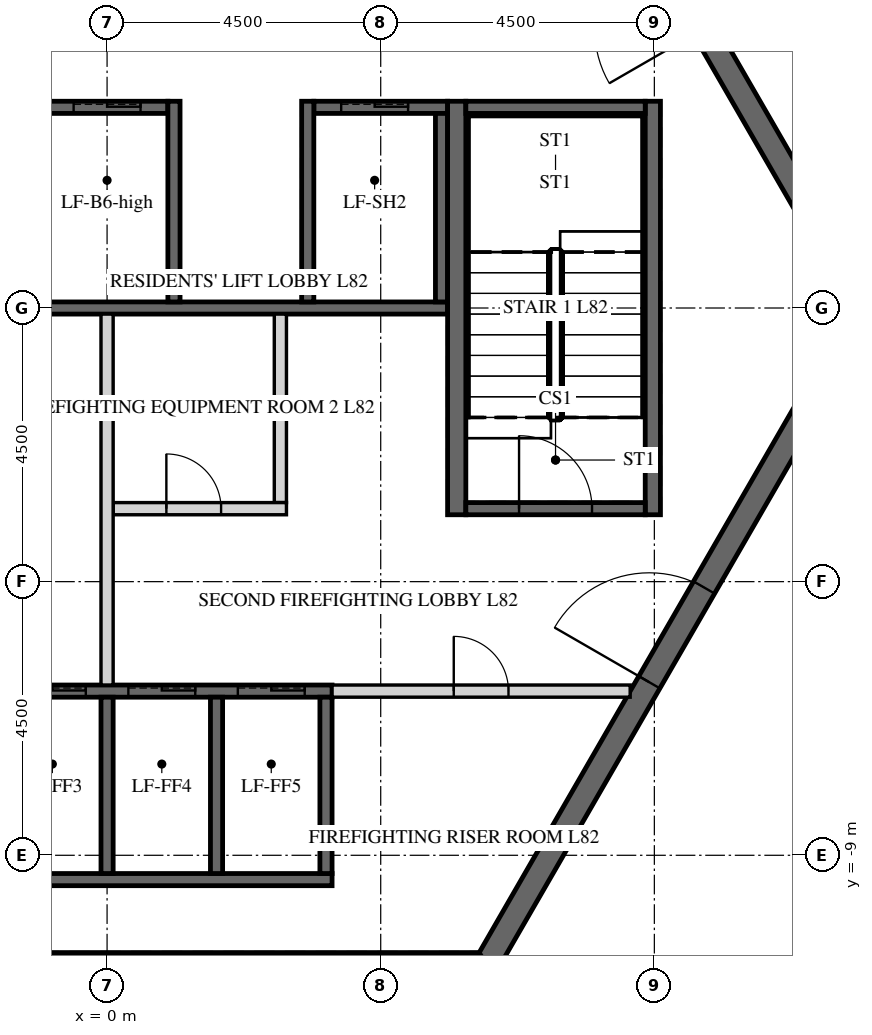
"""IFC4 building model, lengths in metres.
Left out: names, types, materials, properties, quantities, classifications, styles, units other than length and angle.
Written with IfcOpenShell. Run it as: python <this file> out.ifc"""

import sys

from ifc_helpers import new_model, si_unit, direction, frame, frame_2d, origin, place, context, subcontext, project, spatial, polyline, rectangle, outline, extrude, element, fill, save


model = new_model("IFC4")
c1 = context("Model", 3, precision=1e-05, world=origin(), true_north=direction((0.0, 1.0)))
c2 = subcontext(c1, "Body", "Model", "MODEL_VIEW")
j1 = project(units=[si_unit("LENGTHUNIT", "METRE"), si_unit("PLANEANGLEUNIT", "RADIAN")], contexts=[c1])
p1 = place(None, origin())
s1 = spatial("IfcSite", under=j1, at=p1, CompositionType="ELEMENT")
p2 = place(p1, origin())
s2 = spatial("IfcBuilding", under=s1, at=p2, CompositionType="ELEMENT")
p3 = place(p2, frame((0.0, 0.0, 338.1)))
s3 = spatial("IfcBuildingStorey", under=s2, at=p3, CompositionType="ELEMENT", Elevation=338.1)
p4 = place(p3, frame((-6.235, -10.8, -0.3), z_axis=(0.0, 0.0, 1.0), x_axis=(1.0, 0.0, 0.0)))
e1 = element("IfcWall", 1, at=p4, inside=s3, PredefinedType="SHEAR", context=c2, shape_type="SweptSolid", body=[
    extrude(outline(polyline([(-0.115, -0.2), (12.586, -0.2), (12.355, 0.2), (0.115, 0.2), (-0.115, -0.2)])), origin(), (0.0, 0.0, 1.0), 5.4),
])
p5 = place(p3, frame((6.235, -10.8, -0.3), z_axis=(0.0, 0.0, 1.0), x_axis=(0.499996419489, 0.866027470984, 0.0)))
e2 = element("IfcWall", 2, at=p5, inside=s3, PredefinedType="SHEAR", context=c2, shape_type="SweptSolid", body=[
    extrude(outline(polyline([(-0.115, -0.2), (12.586, -0.2), (12.355, 0.2), (0.115, 0.2), (-0.115, -0.2)])), origin(), (0.0, 0.0, 1.0), 5.4),
])
p6 = place(p5, frame((5.364, 0.0, 0.3)))
e3 = element("IfcOpeningElement", 3, at=p6, cuts=e2, PredefinedType="OPENING", context=c2, shape_type="SweptSolid", body=[
    extrude(rectangle(XDim=1.8, YDim=2.4, at=frame_2d((0.9, 1.2))), frame((0.0, 0.21, 0.0), z_axis=(0.0, -1.0, 0.0), x_axis=(1.0, 0.0, 0.0)), (0.0, 0.0, 1.0), 0.42),
])
p7 = place(p3, frame((12.471, 0.0, -0.3), z_axis=(0.0, 0.0, 1.0), x_axis=(-0.499996419489, 0.866027470984, 0.0)))
e4 = element("IfcWall", 4, at=p7, inside=s3, PredefinedType="SHEAR", context=c2, shape_type="SweptSolid", body=[
    extrude(outline(polyline([(-0.115, -0.2), (12.586, -0.2), (12.355, 0.2), (0.115, 0.2), (-0.115, -0.2)])), origin(), (0.0, 0.0, 1.0), 5.4),
])
p8 = place(p7, frame((5.306, 0.0, 0.3)))
e5 = element("IfcOpeningElement", 5, at=p8, cuts=e4, PredefinedType="OPENING", context=c2, shape_type="SweptSolid", body=[
    extrude(rectangle(XDim=1.8, YDim=2.4, at=frame_2d((0.9, 1.2))), frame((0.0, 0.21, 0.0), z_axis=(0.0, -1.0, 0.0), x_axis=(1.0, 0.0, 0.0)), (0.0, 0.0, 1.0), 0.42),
])
p9 = place(p3, frame((-5.6, 3.3, -0.25), z_axis=(0.0, 0.0, 1.0), x_axis=(1.0, 0.0, 0.0)))
e6 = element("IfcWall", 6, at=p9, inside=s3, PredefinedType="SHEAR", context=c2, shape_type="SweptSolid", body=[
    extrude(rectangle(XDim=6.6, YDim=0.2, at=frame_2d((3.3, 0.0))), origin(), (0.0, 0.0, 1.0), 5.4),
])
p10 = place(p9, frame((0.65, 0.0, 0.25)))
e7 = element("IfcOpeningElement", 7, at=p10, cuts=e6, PredefinedType="OPENING", context=c2, shape_type="SweptSolid", body=[
    extrude(rectangle(XDim=1.1, YDim=2.1, at=frame_2d((0.55, 1.05))), frame((0.0, 0.11, 0.0), z_axis=(0.0, -1.0, 0.0), x_axis=(1.0, 0.0, 0.0)), (0.0, 0.0, 1.0), 0.22),
])
p11 = place(p9, frame((2.85, 0.0, 0.25)))
e8 = element("IfcOpeningElement", 8, at=p11, cuts=e6, PredefinedType="OPENING", context=c2, shape_type="SweptSolid", body=[
    extrude(rectangle(XDim=1.1, YDim=2.1, at=frame_2d((0.55, 1.05))), frame((0.0, 0.11, 0.0), z_axis=(0.0, -1.0, 0.0), x_axis=(1.0, 0.0, 0.0)), (0.0, 0.0, 1.0), 0.22),
])
p12 = place(p9, frame((5.05, 0.0, 0.25)))
e9 = element("IfcOpeningElement", 9, at=p12, cuts=e6, PredefinedType="OPENING", context=c2, shape_type="SweptSolid", body=[
    extrude(rectangle(XDim=1.1, YDim=2.1, at=frame_2d((0.55, 1.05))), frame((0.0, 0.11, 0.0), z_axis=(0.0, -1.0, 0.0), x_axis=(1.0, 0.0, 0.0)), (0.0, 0.0, 1.0), 0.22),
])
p13 = place(p3, frame((3.4, 3.3, -0.25), z_axis=(0.0, 0.0, 1.0), x_axis=(1.0, 0.0, 0.0)))
e10 = element("IfcWall", 10, at=p13, inside=s3, PredefinedType="SHEAR", context=c2, shape_type="SweptSolid", body=[
    extrude(rectangle(XDim=2.2, YDim=0.2, at=frame_2d((1.1, 0.0))), origin(), (0.0, 0.0, 1.0), 5.4),
])
p14 = place(p13, frame((0.45, 0.0, 0.25)))
e11 = element("IfcOpeningElement", 11, at=p14, cuts=e10, PredefinedType="OPENING", context=c2, shape_type="SweptSolid", body=[
    extrude(rectangle(XDim=1.1, YDim=2.1, at=frame_2d((0.55, 1.05))), frame((0.0, 0.11, 0.0), z_axis=(0.0, -1.0, 0.0), x_axis=(1.0, 0.0, 0.0)), (0.0, 0.0, 1.0), 0.22),
])
p15 = place(p3, frame((-5.6, 0.0, -0.25), z_axis=(0.0, 0.0, 1.0), x_axis=(1.0, 0.0, 0.0)))
e12 = element("IfcWall", 12, at=p15, inside=s3, PredefinedType="SHEAR", context=c2, shape_type="SweptSolid", body=[
    extrude(rectangle(XDim=11.2, YDim=0.2, at=frame_2d((5.6, 0.0))), origin(), (0.0, 0.0, 1.0), 5.4),
])
for number, where, z_axis, x_axis in (
    (13, (1.1, 0.1, -0.25), (0.0, 0.0, 1.0), (0.0, 1.0, 0.0)),
    (14, (3.3, 0.1, -0.25), (0.0, 0.0, 1.0), (0.0, 1.0, 0.0)),
):
    element("IfcWall", number, at=place(p3, frame(where, z_axis=z_axis, x_axis=x_axis)), inside=s3, PredefinedType="SHEAR", context=c2, shape_type="SweptSolid", body=[
        extrude(rectangle(XDim=3.3, YDim=0.2, at=frame_2d((1.65, 0.0))), origin(), (0.0, 0.0, 1.0), 5.4),
    ])
p16 = place(p3, frame((5.5, 0.1, -0.25), z_axis=(0.0, 0.0, 1.0), x_axis=(0.0, 1.0, 0.0)))
e15 = element("IfcWall", 15, at=p16, inside=s3, PredefinedType="SHEAR", context=c2, shape_type="SweptSolid", body=[
    extrude(rectangle(XDim=3.1, YDim=0.2, at=frame_2d((1.55, 0.0))), origin(), (0.0, 0.0, 1.0), 5.4),
])
p17 = place(p3, frame((-5.5, -6.3, -0.25), z_axis=(0.0, 0.0, 1.0), x_axis=(1.0, 0.0, 0.0)))
e16 = element("IfcWall", 16, at=p17, inside=s3, PredefinedType="SHEAR", context=c2, shape_type="SweptSolid", body=[
    extrude(rectangle(XDim=9.2, YDim=0.2, at=frame_2d((4.6, 0.0))), origin(), (0.0, 0.0, 1.0), 5.4),
])
p18 = place(p17, frame((0.45, 0.0, 0.25)))
e17 = element("IfcOpeningElement", 17, at=p18, cuts=e16, PredefinedType="OPENING", context=c2, shape_type="SweptSolid", body=[
    extrude(rectangle(XDim=1.1, YDim=2.1, at=frame_2d((0.55, 1.05))), frame((0.0, 0.11, 0.0), z_axis=(0.0, -1.0, 0.0), x_axis=(1.0, 0.0, 0.0)), (0.0, 0.0, 1.0), 0.22),
])
p19 = place(p17, frame((2.25, 0.0, 0.25)))
e18 = element("IfcOpeningElement", 18, at=p19, cuts=e16, PredefinedType="OPENING", context=c2, shape_type="SweptSolid", body=[
    extrude(rectangle(XDim=1.1, YDim=2.1, at=frame_2d((0.55, 1.05))), frame((0.0, 0.11, 0.0), z_axis=(0.0, -1.0, 0.0), x_axis=(1.0, 0.0, 0.0)), (0.0, 0.0, 1.0), 0.22),
])
p20 = place(p17, frame((4.05, 0.0, 0.25)))
e19 = element("IfcOpeningElement", 19, at=p20, cuts=e16, PredefinedType="OPENING", context=c2, shape_type="SweptSolid", body=[
    extrude(rectangle(XDim=1.1, YDim=2.1, at=frame_2d((0.55, 1.05))), frame((0.0, 0.11, 0.0), z_axis=(0.0, -1.0, 0.0), x_axis=(1.0, 0.0, 0.0)), (0.0, 0.0, 1.0), 0.22),
])
p21 = place(p17, frame((5.85, 0.0, 0.25)))
e20 = element("IfcOpeningElement", 20, at=p21, cuts=e16, PredefinedType="OPENING", context=c2, shape_type="SweptSolid", body=[
    extrude(rectangle(XDim=1.1, YDim=2.1, at=frame_2d((0.55, 1.05))), frame((0.0, 0.11, 0.0), z_axis=(0.0, -1.0, 0.0), x_axis=(1.0, 0.0, 0.0)), (0.0, 0.0, 1.0), 0.22),
])
p22 = place(p17, frame((7.65, 0.0, 0.25)))
e21 = element("IfcOpeningElement", 21, at=p22, cuts=e16, PredefinedType="OPENING", context=c2, shape_type="SweptSolid", body=[
    extrude(rectangle(XDim=1.1, YDim=2.1, at=frame_2d((0.55, 1.05))), frame((0.0, 0.11, 0.0), z_axis=(0.0, -1.0, 0.0), x_axis=(1.0, 0.0, 0.0)), (0.0, 0.0, 1.0), 0.22),
])
p23 = place(p3, frame((-5.5, -9.4, -0.25), z_axis=(0.0, 0.0, 1.0), x_axis=(1.0, 0.0, 0.0)))
e22 = element("IfcWall", 22, at=p23, inside=s3, PredefinedType="SHEAR", context=c2, shape_type="SweptSolid", body=[
    extrude(rectangle(XDim=9.2, YDim=0.2, at=frame_2d((4.6, 0.0))), origin(), (0.0, 0.0, 1.0), 5.4),
])
for number, where, z_axis, x_axis in (
    (23, (0.0, -9.3, -0.25), (0.0, 0.0, 1.0), (0.0, 1.0, 0.0)),
    (24, (1.8, -9.3, -0.25), (0.0, 0.0, 1.0), (0.0, 1.0, 0.0)),
    (25, (3.6, -9.3, -0.25), (0.0, 0.0, 1.0), (0.0, 1.0, 0.0)),
):
    element("IfcWall", number, at=place(p3, frame(where, z_axis=z_axis, x_axis=x_axis)), inside=s3, PredefinedType="SHEAR", context=c2, shape_type="SweptSolid", body=[
        extrude(rectangle(XDim=2.9, YDim=0.2, at=frame_2d((1.45, 0.0))), origin(), (0.0, 0.0, 1.0), 5.4),
    ])
p24 = place(p3, frame((0.1, -3.3, 0.0), z_axis=(0.0, 0.0, 1.0), x_axis=(1.0, 0.0, 0.0)))
e26 = element("IfcWall", 26, at=p24, inside=s3, PredefinedType="PARTITIONING", context=c2, shape_type="SweptSolid", body=[
    extrude(rectangle(XDim=2.85, YDim=0.2, at=frame_2d((1.425, 0.0))), origin(), (0.0, 0.0, 1.0), 5.15),
])
p25 = place(p24, frame((0.875, 0.0, 0.0)))
e27 = element("IfcOpeningElement", 27, at=p25, cuts=e26, PredefinedType="OPENING", context=c2, shape_type="SweptSolid", body=[
    extrude(rectangle(XDim=0.9, YDim=2.1, at=frame_2d((0.45, 1.05))), frame((0.0, 0.11, 0.0), z_axis=(0.0, -1.0, 0.0), x_axis=(1.0, 0.0, 0.0)), (0.0, 0.0, 1.0), 0.22),
])
p26 = place(p3, frame((2.85, -3.2, 0.0), z_axis=(0.0, 0.0, 1.0), x_axis=(0.0, 1.0, 0.0)))
e28 = element("IfcWall", 28, at=p26, inside=s3, PredefinedType="PARTITIONING", context=c2, shape_type="SweptSolid", body=[
    extrude(rectangle(XDim=3.1, YDim=0.2, at=frame_2d((1.55, 0.0))), origin(), (0.0, 0.0, 1.0), 5.15),
])
p27 = place(p3, frame((0.0, -6.2, 0.0), z_axis=(0.0, 0.0, 1.0), x_axis=(0.0, 1.0, 0.0)))
e29 = element("IfcWall", 29, at=p27, inside=s3, PredefinedType="PARTITIONING", context=c2, shape_type="SweptSolid", body=[
    extrude(rectangle(XDim=6.1, YDim=0.2, at=frame_2d((3.05, 0.0))), origin(), (0.0, 0.0, 1.0), 5.15),
])
p28 = place(p3, frame((3.7, -6.3, 0.0), z_axis=(0.0, 0.0, 1.0), x_axis=(1.0, 0.0, 0.0)))
e30 = element("IfcWall", 30, at=p28, inside=s3, PredefinedType="PARTITIONING", context=c2, shape_type="SweptSolid", body=[
    extrude(rectangle(XDim=4.903, YDim=0.2, at=frame_2d((2.451, 0.0))), origin(), (0.0, 0.0, 1.0), 5.15),
])
p29 = place(p28, frame((2.001, 0.0, 0.0)))
e31 = element("IfcOpeningElement", 31, at=p29, cuts=e30, PredefinedType="OPENING", context=c2, shape_type="SweptSolid", body=[
    extrude(rectangle(XDim=0.9, YDim=2.1, at=frame_2d((0.45, 1.05))), frame((0.0, 0.11, 0.0), z_axis=(0.0, -1.0, 0.0), x_axis=(1.0, 0.0, 0.0)), (0.0, 0.0, 1.0), 0.22),
])
p30 = place(p3, frame((5.75, -3.4, -0.25), z_axis=(0.0, 0.0, 1.0), x_axis=(0.0, 1.0, 0.0)))
e32 = element("IfcWall", 32, at=p30, inside=s3, PredefinedType="SHEAR", context=c2, shape_type="SweptSolid", body=[
    extrude(rectangle(XDim=6.8, YDim=0.3, at=frame_2d((3.4, 0.0))), origin(), (0.0, 0.0, 1.0), 5.4),
])
p31 = place(p3, frame((8.975, -3.4, -0.25), z_axis=(0.0, 0.0, 1.0), x_axis=(0.0, 1.0, 0.0)))
e33 = element("IfcWall", 33, at=p31, inside=s3, PredefinedType="SHEAR", context=c2, shape_type="SweptSolid", body=[
    extrude(rectangle(XDim=6.8, YDim=0.25, at=frame_2d((3.4, 0.0))), origin(), (0.0, 0.0, 1.0), 5.4),
])
p32 = place(p3, frame((5.9, 3.3, -0.25), z_axis=(0.0, 0.0, 1.0), x_axis=(1.0, 0.0, 0.0)))
e34 = element("IfcWall", 34, at=p32, inside=s3, PredefinedType="SHEAR", context=c2, shape_type="SweptSolid", body=[
    extrude(rectangle(XDim=2.95, YDim=0.2, at=frame_2d((1.475, 0.0))), origin(), (0.0, 0.0, 1.0), 5.4),
])
p33 = place(p3, frame((5.9, -3.3, -0.25), z_axis=(0.0, 0.0, 1.0), x_axis=(1.0, 0.0, 0.0)))
e35 = element("IfcWall", 35, at=p33, inside=s3, PredefinedType="SHEAR", context=c2, shape_type="SweptSolid", body=[
    extrude(rectangle(XDim=2.95, YDim=0.2, at=frame_2d((1.475, 0.0))), origin(), (0.0, 0.0, 1.0), 5.4),
])
p34 = place(p33, frame((0.875, 0.0, 0.25)))
e36 = element("IfcOpeningElement", 36, at=p34, cuts=e35, PredefinedType="OPENING", context=c2, shape_type="SweptSolid", body=[
    extrude(rectangle(XDim=1.2, YDim=2.4, at=frame_2d((0.6, 1.2))), frame((0.0, 0.11, 0.0), z_axis=(0.0, -1.0, 0.0), x_axis=(1.0, 0.0, 0.0)), (0.0, 0.0, 1.0), 0.22),
])
p35 = place(p6, origin())
e37 = element("IfcDoor", 37, at=p35, inside=s3, OperationType="DOUBLE_DOOR_SINGLE_SWING", PredefinedType="DOOR", context=c2, shape_type="SweptSolid", body=[
    extrude(rectangle(XDim=1.8, YDim=2.4, at=frame_2d((0.9, 1.2))), frame((0.0, 0.025, 0.0), z_axis=(0.0, -1.0, 0.0), x_axis=(1.0, 0.0, 0.0)), (0.0, 0.0, 1.0), 0.05),
])
fill(e3, e37)
p36 = place(p25, origin())
e38 = element("IfcDoor", 38, at=p36, inside=s3, OperationType="SINGLE_SWING_LEFT", PredefinedType="DOOR", context=c2, shape_type="SweptSolid", body=[
    extrude(rectangle(XDim=0.9, YDim=2.1, at=frame_2d((0.45, 1.05))), frame((0.0, 0.025, 0.0), z_axis=(0.0, -1.0, 0.0), x_axis=(1.0, 0.0, 0.0)), (0.0, 0.0, 1.0), 0.05),
])
fill(e27, e38)
p37 = place(p29, origin())
e39 = element("IfcDoor", 39, at=p37, inside=s3, OperationType="SINGLE_SWING_LEFT", PredefinedType="DOOR", context=c2, shape_type="SweptSolid", body=[
    extrude(rectangle(XDim=0.9, YDim=2.1, at=frame_2d((0.45, 1.05))), frame((0.0, 0.025, 0.0), z_axis=(0.0, -1.0, 0.0), x_axis=(1.0, 0.0, 0.0)), (0.0, 0.0, 1.0), 0.05),
])
fill(e31, e39)
p38 = place(p34, origin())
e40 = element("IfcDoor", 40, at=p38, inside=s3, OperationType="SINGLE_SWING_LEFT", PredefinedType="DOOR", context=c2, shape_type="SweptSolid", body=[
    extrude(rectangle(XDim=1.2, YDim=2.4, at=frame_2d((0.6, 1.2))), frame((0.0, 0.025, 0.0), z_axis=(0.0, -1.0, 0.0), x_axis=(1.0, 0.0, 0.0)), (0.0, 0.0, 1.0), 0.05),
])
fill(e36, e40)
p39 = place(p12, origin())
e41 = element("IfcDoor", 41, at=p39, inside=s3, OperationType="SLIDING_TO_LEFT", PredefinedType="DOOR", context=c2, shape_type="SweptSolid", body=[
    extrude(rectangle(XDim=1.1, YDim=2.1, at=frame_2d((0.55, 1.05))), frame((0.0, 0.025, 0.0), z_axis=(0.0, -1.0, 0.0), x_axis=(1.0, 0.0, 0.0)), (0.0, 0.0, 1.0), 0.05),
])
fill(e9, e41)
p40 = place(p14, origin())
e42 = element("IfcDoor", 42, at=p40, inside=s3, OperationType="SLIDING_TO_LEFT", PredefinedType="DOOR", context=c2, shape_type="SweptSolid", body=[
    extrude(rectangle(XDim=1.1, YDim=2.1, at=frame_2d((0.55, 1.05))), frame((0.0, 0.025, 0.0), z_axis=(0.0, -1.0, 0.0), x_axis=(1.0, 0.0, 0.0)), (0.0, 0.0, 1.0), 0.05),
])
fill(e11, e42)
p41 = place(p20, origin())
e43 = element("IfcDoor", 43, at=p41, inside=s3, OperationType="SLIDING_TO_LEFT", PredefinedType="DOOR", context=c2, shape_type="SweptSolid", body=[
    extrude(rectangle(XDim=1.1, YDim=2.1, at=frame_2d((0.55, 1.05))), frame((0.0, 0.025, 0.0), z_axis=(0.0, -1.0, 0.0), x_axis=(1.0, 0.0, 0.0)), (0.0, 0.0, 1.0), 0.05),
])
fill(e19, e43)
p42 = place(p21, origin())
e44 = element("IfcDoor", 44, at=p42, inside=s3, OperationType="SLIDING_TO_LEFT", PredefinedType="DOOR", context=c2, shape_type="SweptSolid", body=[
    extrude(rectangle(XDim=1.1, YDim=2.1, at=frame_2d((0.55, 1.05))), frame((0.0, 0.025, 0.0), z_axis=(0.0, -1.0, 0.0), x_axis=(1.0, 0.0, 0.0)), (0.0, 0.0, 1.0), 0.05),
])
fill(e20, e44)
p43 = place(p22, origin())
e45 = element("IfcDoor", 45, at=p43, inside=s3, OperationType="SLIDING_TO_LEFT", PredefinedType="DOOR", context=c2, shape_type="SweptSolid", body=[
    extrude(rectangle(XDim=1.1, YDim=2.1, at=frame_2d((0.55, 1.05))), frame((0.0, 0.025, 0.0), z_axis=(0.0, -1.0, 0.0), x_axis=(1.0, 0.0, 0.0)), (0.0, 0.0, 1.0), 0.05),
])
fill(e21, e45)
save(model, sys.argv[1])
